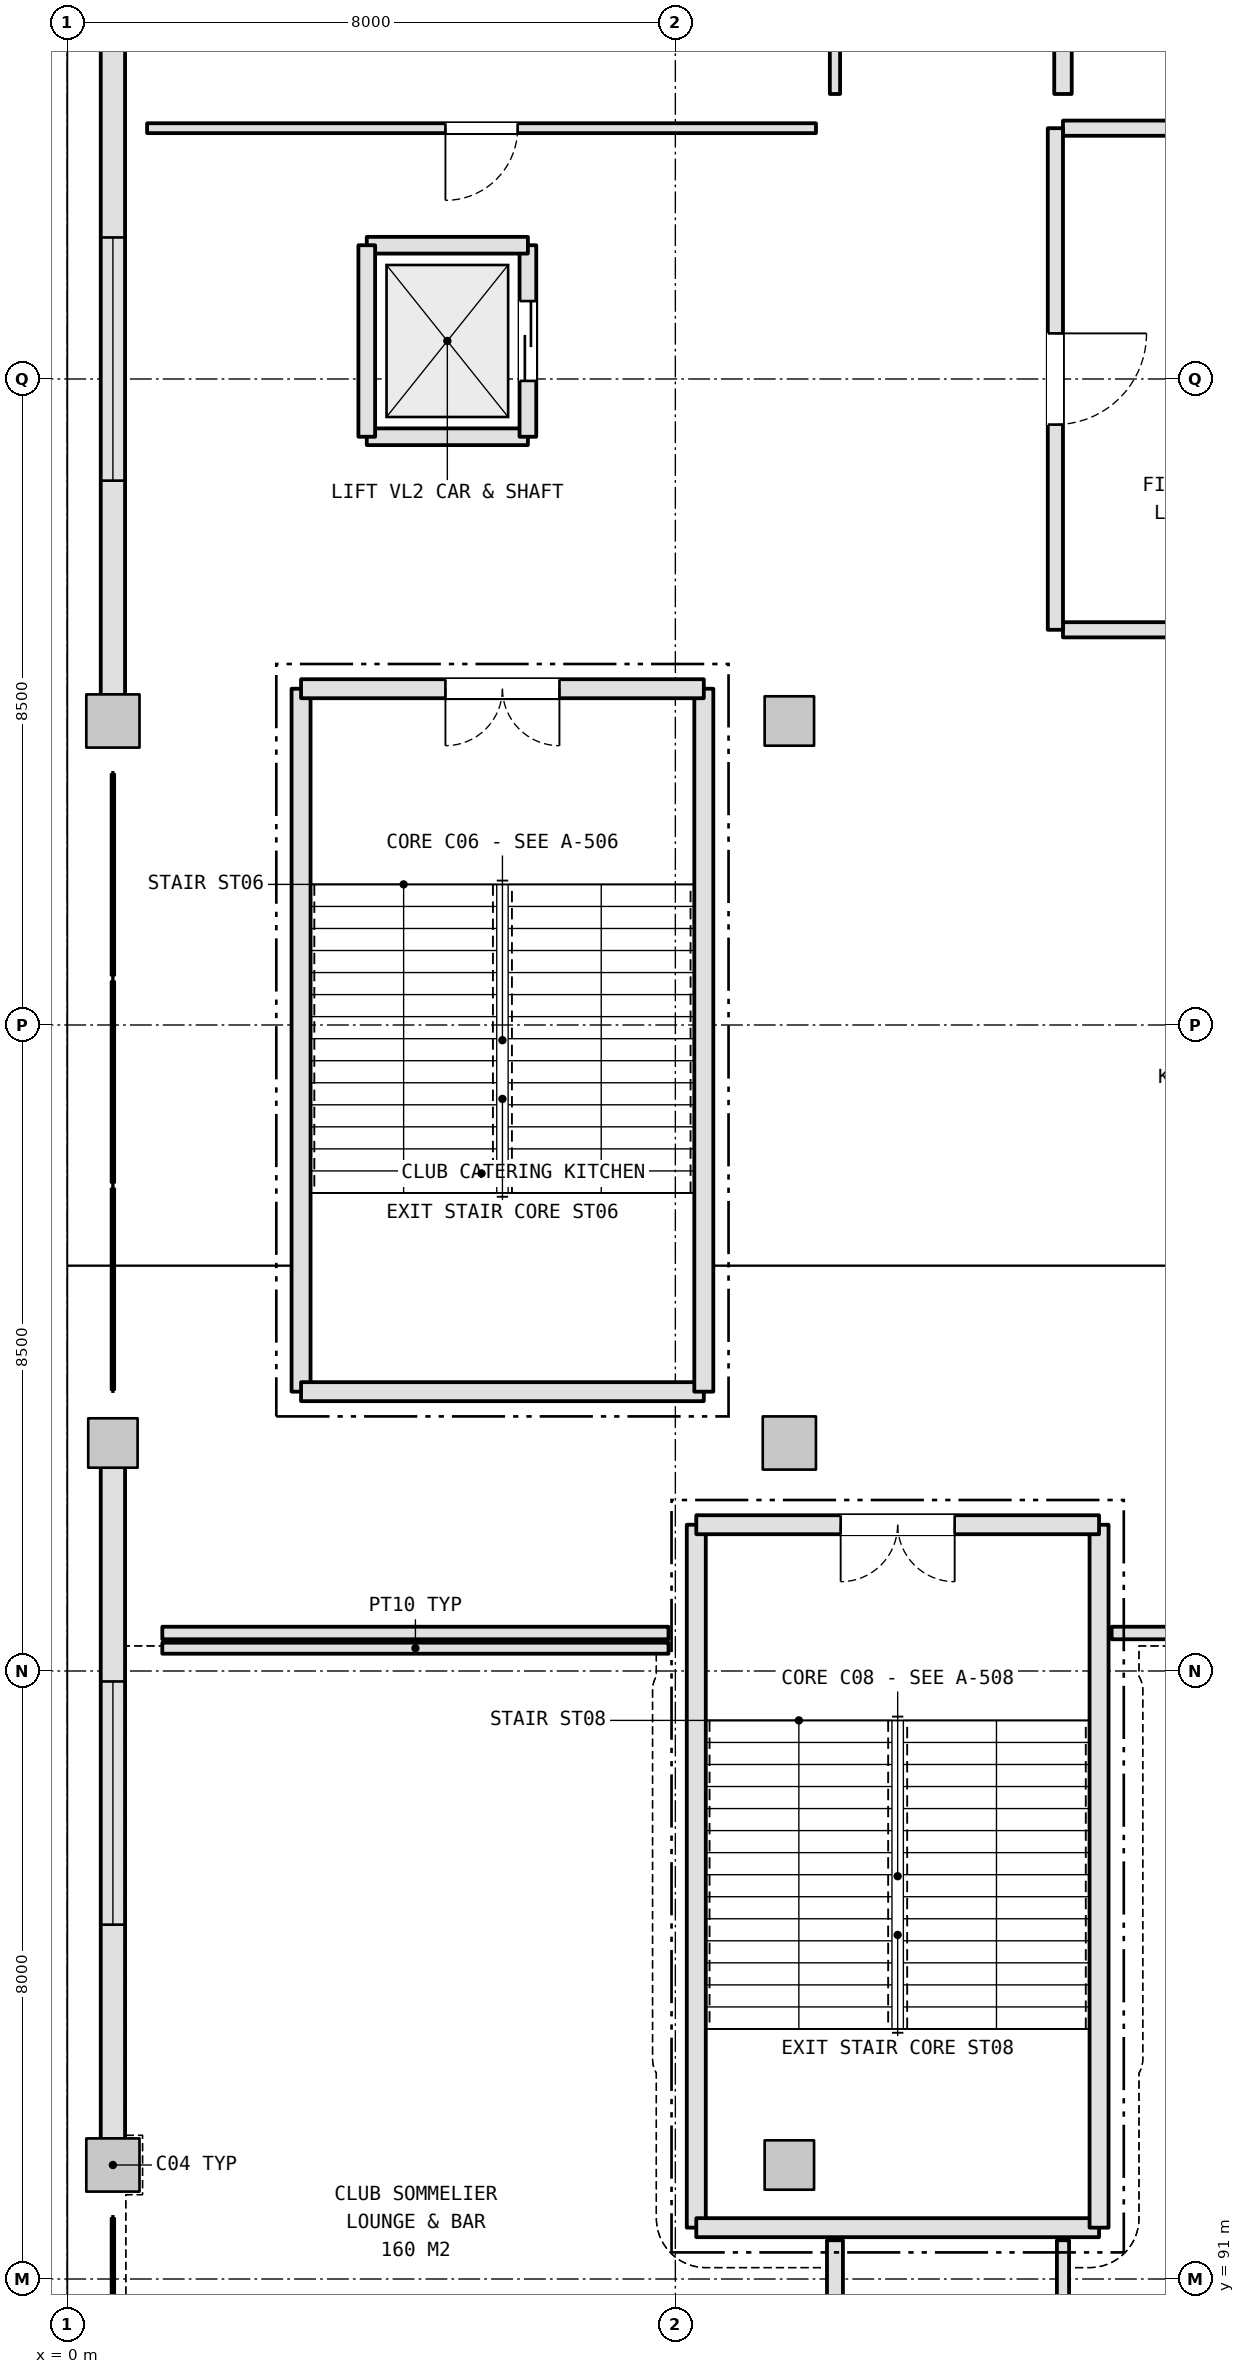
"""IFC4 building model, lengths in metres.
Left out: names, types, materials, properties, quantities, classifications, styles, units other than length and angle.
Written with IfcOpenShell. Run it as: python <this file> out.ifc"""

import sys

from ifc_helpers import new_model, si_unit, direction, frame, frame_2d, origin, origin_2d, place, context, subcontext, project, spatial, rectangle, extrude, element, fill, save


model = new_model("IFC4")
c1 = context("Model", 3, precision=1e-05, world=origin(), true_north=direction((0.0, 1.0)))
c2 = subcontext(c1, "Body", "Model", "MODEL_VIEW")
j1 = project(units=[si_unit("LENGTHUNIT", "METRE"), si_unit("PLANEANGLEUNIT", "RADIAN")], contexts=[c1])
p1 = place(None, origin())
s1 = spatial("IfcSite", under=j1, at=p1, CompositionType="ELEMENT")
p2 = place(p1, origin())
s2 = spatial("IfcBuilding", under=s1, at=p2, CompositionType="ELEMENT")
p3 = place(p2, frame((0.0, 0.0, 10.8)))
s3 = spatial("IfcBuildingStorey", under=s2, at=p3, CompositionType="ELEMENT", Elevation=10.8)
p4 = place(p3, frame((0.6, 92.5, 0.0), z_axis=(0.0, 0.0, 1.0), x_axis=(1.0, 0.0, 0.0)))
e1 = element("IfcColumn", 1, at=p4, inside=s3, PredefinedType="COLUMN", context=c2, shape_type="SweptSolid", body=[
    extrude(rectangle(XDim=0.7, YDim=0.7, at=origin_2d()), origin(), (0.0, 0.0, 1.0), 5.4),
])
p5 = place(p3, frame((0.6, 102.0, 0.0), z_axis=(0.0, 0.0, 1.0), x_axis=(1.0, 0.0, 0.0)))
e2 = element("IfcColumn", 2, at=p5, inside=s3, PredefinedType="COLUMN", context=c2, shape_type="SweptSolid", body=[
    extrude(rectangle(XDim=0.65, YDim=0.65, at=origin_2d()), origin(), (0.0, 0.0, 1.0), 5.4),
])
p6 = place(p3, frame((0.6, 111.5, 0.0), z_axis=(0.0, 0.0, 1.0), x_axis=(1.0, 0.0, 0.0)))
e3 = element("IfcColumn", 3, at=p6, inside=s3, PredefinedType="COLUMN", context=c2, shape_type="SweptSolid", body=[
    extrude(rectangle(XDim=0.7, YDim=0.7, at=origin_2d()), origin(), (0.0, 0.0, 1.0), 5.4),
])
p7 = place(p3, frame((9.5, 92.5, 0.0), z_axis=(0.0, 0.0, 1.0), x_axis=(1.0, 0.0, 0.0)))
e4 = element("IfcColumn", 4, at=p7, inside=s3, PredefinedType="COLUMN", context=c2, shape_type="SweptSolid", body=[
    extrude(rectangle(XDim=0.65, YDim=0.65, at=origin_2d()), origin(), (0.0, 0.0, 1.0), 5.4),
])
p8 = place(p3, frame((9.5, 102.0, 0.0), z_axis=(0.0, 0.0, 1.0), x_axis=(1.0, 0.0, 0.0)))
e5 = element("IfcColumn", 5, at=p8, inside=s3, PredefinedType="COLUMN", context=c2, shape_type="SweptSolid", body=[
    extrude(rectangle(XDim=0.7, YDim=0.7, at=origin_2d()), origin(), (0.0, 0.0, 1.0), 5.4),
])
p9 = place(p3, frame((9.5, 111.5, 0.0), z_axis=(0.0, 0.0, 1.0), x_axis=(1.0, 0.0, 0.0)))
e6 = element("IfcColumn", 6, at=p9, inside=s3, PredefinedType="COLUMN", context=c2, shape_type="SweptSolid", body=[
    extrude(rectangle(XDim=0.65, YDim=0.65, at=origin_2d()), origin(), (0.0, 0.0, 1.0), 5.4),
])
p10 = place(p3, frame((0.6, 92.838, 0.0), z_axis=(0.0, 0.0, 1.0), x_axis=(0.0, 1.0, 0.0)))
e7 = element("IfcWall", 7, at=p10, inside=s3, PredefinedType="SOLIDWALL", context=c2, shape_type="SweptSolid", body=[
    extrude(rectangle(XDim=8.849, YDim=0.32, at=frame_2d((4.425, 0.0))), origin(), (0.0, 0.0, 1.0), 4.485),
])
p11 = place(p10, frame((2.824, 0.0, 1.05)))
e8 = element("IfcOpeningElement", 8, at=p11, cuts=e7, PredefinedType="OPENING", context=c2, shape_type="SweptSolid", body=[
    extrude(rectangle(XDim=3.2, YDim=2.2, at=frame_2d((1.6, 1.1))), frame((0.0, 0.17, 0.0), z_axis=(0.0, -1.0, 0.0), x_axis=(1.0, 0.0, 0.0)), (0.0, 0.0, 1.0), 0.34),
])
p12 = place(p3, frame((0.6, 111.838, 0.0), z_axis=(0.0, 0.0, 1.0), x_axis=(0.0, 1.0, 0.0)))
e9 = element("IfcWall", 9, at=p12, inside=s3, PredefinedType="SOLIDWALL", context=c2, shape_type="SweptSolid", body=[
    extrude(rectangle(XDim=8.849, YDim=0.32, at=frame_2d((4.425, 0.0))), origin(), (0.0, 0.0, 1.0), 4.485),
])
p13 = place(p12, frame((2.824, 0.0, 1.05)))
e10 = element("IfcOpeningElement", 10, at=p13, cuts=e9, PredefinedType="OPENING", context=c2, shape_type="SweptSolid", body=[
    extrude(rectangle(XDim=3.2, YDim=2.2, at=frame_2d((1.6, 1.1))), frame((0.0, 0.17, 0.0), z_axis=(0.0, -1.0, 0.0), x_axis=(1.0, 0.0, 0.0)), (0.0, 0.0, 1.0), 0.34),
])
p14 = place(p3, frame((3.075, 111.925, 0.0), z_axis=(0.0, 0.0, 1.0), x_axis=(0.0, -1.0, 0.0)))
e11 = element("IfcWall", 11, at=p14, inside=s3, PredefinedType="SHEAR", context=c2, shape_type="SweptSolid", body=[
    extrude(rectangle(XDim=9.249, YDim=0.25, at=frame_2d((4.625, 0.0))), origin(), (0.0, 0.0, 1.0), 5.15),
])
p15 = place(p3, frame((3.075, 102.675, 0.0), z_axis=(0.0, 0.0, 1.0), x_axis=(1.0, 0.0, 0.0)))
e12 = element("IfcWall", 12, at=p15, inside=s3, PredefinedType="SHEAR", context=c2, shape_type="SweptSolid", body=[
    extrude(rectangle(XDim=5.299, YDim=0.25, at=frame_2d((2.649, 0.0))), origin(), (0.0, 0.0, 1.0), 5.15),
])
p16 = place(p3, frame((8.375, 102.675, 0.0), z_axis=(0.0, 0.0, 1.0), x_axis=(0.0, 1.0, 0.0)))
e13 = element("IfcWall", 13, at=p16, inside=s3, PredefinedType="SHEAR", context=c2, shape_type="SweptSolid", body=[
    extrude(rectangle(XDim=9.249, YDim=0.25, at=frame_2d((4.625, 0.0))), origin(), (0.0, 0.0, 1.0), 5.15),
])
p17 = place(p3, frame((8.375, 111.925, 0.0), z_axis=(0.0, 0.0, 1.0), x_axis=(-1.0, 0.0, 0.0)))
e14 = element("IfcWall", 14, at=p17, inside=s3, PredefinedType="SHEAR", context=c2, shape_type="SweptSolid", body=[
    extrude(rectangle(XDim=5.299, YDim=0.25, at=frame_2d((2.649, 0.0))), origin(), (0.0, 0.0, 1.0), 5.15),
])
p18 = place(p17, frame((1.9, 0.0, 0.0)))
e15 = element("IfcOpeningElement", 15, at=p18, cuts=e14, PredefinedType="OPENING", context=c2, shape_type="SweptSolid", body=[
    extrude(rectangle(XDim=1.5, YDim=2.2, at=frame_2d((0.75, 1.1))), frame((0.0, 0.135, 0.0), z_axis=(0.0, -1.0, 0.0), x_axis=(1.0, 0.0, 0.0)), (0.0, 0.0, 1.0), 0.27),
])
p19 = place(p3, frame((8.275, 100.925, 0.0), z_axis=(0.0, 0.0, 1.0), x_axis=(0.0, -1.0, 0.0)))
e16 = element("IfcWall", 16, at=p19, inside=s3, PredefinedType="SHEAR", context=c2, shape_type="SweptSolid", body=[
    extrude(rectangle(XDim=9.249, YDim=0.25, at=frame_2d((4.625, 0.0))), origin(), (0.0, 0.0, 1.0), 5.15),
])
p20 = place(p3, frame((8.275, 91.675, 0.0), z_axis=(0.0, 0.0, 1.0), x_axis=(1.0, 0.0, 0.0)))
e17 = element("IfcWall", 17, at=p20, inside=s3, PredefinedType="SHEAR", context=c2, shape_type="SweptSolid", body=[
    extrude(rectangle(XDim=5.299, YDim=0.25, at=frame_2d((2.65, 0.0))), origin(), (0.0, 0.0, 1.0), 5.15),
])
p21 = place(p3, frame((13.575, 91.675, 0.0), z_axis=(0.0, 0.0, 1.0), x_axis=(0.0, 1.0, 0.0)))
e18 = element("IfcWall", 18, at=p21, inside=s3, PredefinedType="SHEAR", context=c2, shape_type="SweptSolid", body=[
    extrude(rectangle(XDim=9.249, YDim=0.25, at=frame_2d((4.625, 0.0))), origin(), (0.0, 0.0, 1.0), 5.15),
])
p22 = place(p3, frame((13.575, 100.925, 0.0), z_axis=(0.0, 0.0, 1.0), x_axis=(-1.0, 0.0, 0.0)))
e19 = element("IfcWall", 19, at=p22, inside=s3, PredefinedType="SHEAR", context=c2, shape_type="SweptSolid", body=[
    extrude(rectangle(XDim=5.299, YDim=0.25, at=frame_2d((2.65, 0.0))), origin(), (0.0, 0.0, 1.0), 5.15),
])
p23 = place(p22, frame((1.9, 0.0, 0.0)))
e20 = element("IfcOpeningElement", 20, at=p23, cuts=e19, PredefinedType="OPENING", context=c2, shape_type="SweptSolid", body=[
    extrude(rectangle(XDim=1.5, YDim=2.2, at=frame_2d((0.75, 1.1))), frame((0.0, 0.135, 0.0), z_axis=(0.0, -1.0, 0.0), x_axis=(1.0, 0.0, 0.0)), (0.0, 0.0, 1.0), 0.27),
])
for number, where, z_axis, x_axis in (
    (21, (13.1, 112.7, 0.0), (0.0, 0.0, 1.0), (1.0, 0.0, 0.0)),
    (22, (16.5, 119.3, 0.0), (0.0, 0.0, 1.0), (-1.0, 0.0, 0.0)),
):
    element("IfcWall", number, at=place(p3, frame(where, z_axis=z_axis, x_axis=x_axis)), inside=s3, PredefinedType="SOLIDWALL", context=c2, shape_type="SweptSolid", body=[
        extrude(rectangle(XDim=3.4, YDim=0.2, at=frame_2d((1.7, 0.0))), origin(), (0.0, 0.0, 1.0), 5.12),
    ])
p24 = place(p3, frame((13.0, 119.3, 0.0), z_axis=(0.0, 0.0, 1.0), x_axis=(0.0, -1.0, 0.0)))
e23 = element("IfcWall", 23, at=p24, inside=s3, PredefinedType="SOLIDWALL", context=c2, shape_type="SweptSolid", body=[
    extrude(rectangle(XDim=6.6, YDim=0.2, at=frame_2d((3.3, 0.0))), origin(), (0.0, 0.0, 1.0), 5.12),
])
p25 = place(p24, frame((2.7, 0.0, 0.0)))
e24 = element("IfcOpeningElement", 24, at=p25, cuts=e23, PredefinedType="OPENING", context=c2, shape_type="SweptSolid", body=[
    extrude(rectangle(XDim=1.2, YDim=2.2, at=frame_2d((0.6, 1.1))), frame((0.0, 0.11, 0.0), z_axis=(0.0, -1.0, 0.0), x_axis=(1.0, 0.0, 0.0)), (0.0, 0.0, 1.0), 0.22),
])
p26 = place(p3, frame((3.94, 115.24, 0.0), z_axis=(0.0, 0.0, 1.0), x_axis=(1.0, 0.0, 0.0)))
e25 = element("IfcWall", 25, at=p26, inside=s3, PredefinedType="SHEAR", context=c2, shape_type="SweptSolid", body=[
    extrude(rectangle(XDim=2.12, YDim=0.22, at=frame_2d((1.06, 0.0))), origin(), (0.0, 0.0, 1.0), 5.15),
])
p27 = place(p3, frame((6.06, 115.24, 0.0), z_axis=(0.0, 0.0, 1.0), x_axis=(0.0, 1.0, 0.0)))
e26 = element("IfcWall", 26, at=p27, inside=s3, PredefinedType="SHEAR", context=c2, shape_type="SweptSolid", body=[
    extrude(rectangle(XDim=2.52, YDim=0.22, at=frame_2d((1.26, 0.0))), origin(), (0.0, 0.0, 1.0), 5.15),
])
p28 = place(p27, frame((0.735, 0.0, 0.0)))
e27 = element("IfcOpeningElement", 27, at=p28, cuts=e26, PredefinedType="OPENING", context=c2, shape_type="SweptSolid", body=[
    extrude(rectangle(XDim=1.05, YDim=2.15, at=frame_2d((0.525, 1.075))), frame((0.0, 0.12, 0.0), z_axis=(0.0, -1.0, 0.0), x_axis=(1.0, 0.0, 0.0)), (0.0, 0.0, 1.0), 0.24),
])
p29 = place(p3, frame((6.06, 117.76, 0.0), z_axis=(0.0, 0.0, 1.0), x_axis=(-1.0, 0.0, 0.0)))
e28 = element("IfcWall", 28, at=p29, inside=s3, PredefinedType="SHEAR", context=c2, shape_type="SweptSolid", body=[
    extrude(rectangle(XDim=2.12, YDim=0.22, at=frame_2d((1.06, 0.0))), origin(), (0.0, 0.0, 1.0), 5.15),
])
p30 = place(p3, frame((3.94, 117.76, 0.0), z_axis=(0.0, 0.0, 1.0), x_axis=(0.0, -1.0, 0.0)))
e29 = element("IfcWall", 29, at=p30, inside=s3, PredefinedType="SHEAR", context=c2, shape_type="SweptSolid", body=[
    extrude(rectangle(XDim=2.52, YDim=0.22, at=frame_2d((1.26, 0.0))), origin(), (0.0, 0.0, 1.0), 5.15),
])
p31 = place(p3, frame((10.1, 91.51, 0.0), z_axis=(0.0, 0.0, 1.0), x_axis=(0.0, -1.0, 0.0)))
e30 = element("IfcWall", 30, at=p31, inside=s3, PredefinedType="PLUMBINGWALL", context=c2, shape_type="SweptSolid", body=[
    extrude(rectangle(XDim=13.76, YDim=0.21, at=frame_2d((6.88, 0.0))), origin(), (0.0, 0.0, 1.0), 4.678),
])
p32 = place(p31, frame((6.4, 0.0, 0.0)))
e31 = element("IfcOpeningElement", 31, at=p32, cuts=e30, PredefinedType="OPENING", context=c2, shape_type="SweptSolid", body=[
    extrude(rectangle(XDim=0.96, YDim=2.15, at=frame_2d((0.48, 1.075))), frame((0.0, 0.115, 0.0), z_axis=(0.0, -1.0, 0.0), x_axis=(1.0, 0.0, 0.0)), (0.0, 0.0, 1.0), 0.23),
])
p33 = place(p3, frame((1.25, 99.3, 0.0), z_axis=(0.0, 0.0, 1.0), x_axis=(1.0, 0.0, 0.0)))
e32 = element("IfcWall", 32, at=p33, inside=s3, PredefinedType="PARTITIONING", context=c2, shape_type="SweptSolid", body=[
    extrude(rectangle(XDim=6.66, YDim=0.145, at=frame_2d((3.33, 0.0))), origin(), (0.0, 0.0, 1.0), 5.12),
])
p34 = place(p3, frame((13.1, 77.75, 0.0), z_axis=(0.0, 0.0, 1.0), x_axis=(0.0, 1.0, 0.0)))
e33 = element("IfcWall", 33, at=p34, inside=s3, PredefinedType="PARTITIONING", context=c2, shape_type="SweptSolid", body=[
    extrude(rectangle(XDim=13.76, YDim=0.16, at=frame_2d((6.88, 0.0))), origin(), (0.0, 0.0, 1.0), 4.678),
])
p35 = place(p34, frame((6.305, 0.0, 0.0)))
e34 = element("IfcOpeningElement", 34, at=p35, cuts=e33, PredefinedType="OPENING", context=c2, shape_type="SweptSolid", body=[
    extrude(rectangle(XDim=1.15, YDim=2.2, at=frame_2d((0.575, 1.1))), frame((0.0, 0.09, 0.0), z_axis=(0.0, -1.0, 0.0), x_axis=(1.0, 0.0, 0.0)), (0.0, 0.0, 1.0), 0.18),
])
p36 = place(p3, frame((1.05, 119.3, 0.0), z_axis=(0.0, 0.0, 1.0), x_axis=(1.0, 0.0, 0.0)))
e35 = element("IfcWall", 35, at=p36, inside=s3, PredefinedType="PARTITIONING", context=c2, shape_type="SweptSolid", body=[
    extrude(rectangle(XDim=8.8, YDim=0.13, at=frame_2d((4.4, 0.0))), origin(), (0.0, 0.0, 1.0), 4.485),
])
p37 = place(p36, frame((3.925, 0.0, 0.0)))
e36 = element("IfcOpeningElement", 36, at=p37, cuts=e35, PredefinedType="OPENING", context=c2, shape_type="SweptSolid", body=[
    extrude(rectangle(XDim=0.95, YDim=2.15, at=frame_2d((0.475, 1.075))), frame((0.0, 0.075, 0.0), z_axis=(0.0, -1.0, 0.0), x_axis=(1.0, 0.0, 0.0)), (0.0, 0.0, 1.0), 0.15),
])
p38 = place(p3, frame((7.91, 99.5, 0.0), z_axis=(0.0, 0.0, 1.0), x_axis=(-1.0, 0.0, 0.0)))
e37 = element("IfcWall", 37, at=p38, inside=s3, PredefinedType="PARTITIONING", context=c2, shape_type="SweptSolid", body=[
    extrude(rectangle(XDim=6.66, YDim=0.165, at=frame_2d((3.33, 0.0))), origin(), (0.0, 0.0, 1.0), 5.12),
])
p39 = place(p3, frame((17.95, 99.5, 0.0), z_axis=(0.0, 0.0, 1.0), x_axis=(-1.0, 0.0, 0.0)))
e38 = element("IfcWall", 38, at=p39, inside=s3, PredefinedType="PARTITIONING", context=c2, shape_type="SweptSolid", body=[
    extrude(rectangle(XDim=4.21, YDim=0.165, at=frame_2d((2.105, 0.0))), origin(), (0.0, 0.0, 1.0), 5.12),
])
p40 = place(p39, frame((1.555, 0.0, 0.0)))
e39 = element("IfcOpeningElement", 39, at=p40, cuts=e38, PredefinedType="OPENING", context=c2, shape_type="SweptSolid", body=[
    extrude(rectangle(XDim=1.1, YDim=2.15, at=frame_2d((0.55, 1.075))), frame((0.0, 0.093, 0.0), z_axis=(0.0, -1.0, 0.0), x_axis=(1.0, 0.0, 0.0)), (0.0, 0.0, 1.0), 0.185),
])
p41 = place(p3, frame((10.1, 129.05, 0.0), z_axis=(0.0, 0.0, 1.0), x_axis=(0.0, -1.0, 0.0)))
e40 = element("IfcWall", 40, at=p41, inside=s3, PredefinedType="PARTITIONING", context=c2, shape_type="SweptSolid", body=[
    extrude(rectangle(XDim=9.3, YDim=0.135, at=frame_2d((4.65, 0.0))), origin(), (0.0, 0.0, 1.0), 4.678),
])
p42 = place(p41, frame((4.2, 0.0, 0.0)))
e41 = element("IfcOpeningElement", 41, at=p42, cuts=e40, PredefinedType="OPENING", context=c2, shape_type="SweptSolid", body=[
    extrude(rectangle(XDim=1.7, YDim=2.25, at=frame_2d((0.85, 1.125))), frame((0.0, 0.077, 0.0), z_axis=(0.0, -1.0, 0.0), x_axis=(1.0, 0.0, 0.0)), (0.0, 0.0, 1.0), 0.155),
])
p43 = place(p3, frame((13.1, 119.75, 0.0), z_axis=(0.0, 0.0, 1.0), x_axis=(0.0, 1.0, 0.0)))
e42 = element("IfcWall", 42, at=p43, inside=s3, PredefinedType="PLUMBINGWALL", context=c2, shape_type="SweptSolid", body=[
    extrude(rectangle(XDim=9.3, YDim=0.23, at=frame_2d((4.65, 0.0))), origin(), (0.0, 0.0, 1.0), 4.678),
])
p44 = place(p43, frame((4.16, 0.0, 0.0)))
e43 = element("IfcOpeningElement", 43, at=p44, cuts=e42, PredefinedType="OPENING", context=c2, shape_type="SweptSolid", body=[
    extrude(rectangle(XDim=0.98, YDim=2.15, at=frame_2d((0.49, 1.075))), frame((0.0, 0.125, 0.0), z_axis=(0.0, -1.0, 0.0), x_axis=(1.0, 0.0, 0.0)), (0.0, 0.0, 1.0), 0.25),
])
p45 = place(p11, origin())
e44 = element("IfcWindow", 44, at=p45, inside=s3, PartitioningType="SINGLE_PANEL", PredefinedType="WINDOW", context=c2, shape_type="SweptSolid", body=[
    extrude(rectangle(XDim=3.2, YDim=2.2, at=frame_2d((1.6, 1.1))), frame((0.0, 0.03, 0.0), z_axis=(0.0, -1.0, 0.0), x_axis=(1.0, 0.0, 0.0)), (0.0, 0.0, 1.0), 0.06),
])
fill(e8, e44)
p46 = place(p13, origin())
e45 = element("IfcWindow", 45, at=p46, inside=s3, PartitioningType="SINGLE_PANEL", PredefinedType="WINDOW", context=c2, shape_type="SweptSolid", body=[
    extrude(rectangle(XDim=3.2, YDim=2.2, at=frame_2d((1.6, 1.1))), frame((0.0, 0.03, 0.0), z_axis=(0.0, -1.0, 0.0), x_axis=(1.0, 0.0, 0.0)), (0.0, 0.0, 1.0), 0.06),
])
fill(e10, e45)
p47 = place(p18, origin())
e46 = element("IfcDoor", 46, at=p47, inside=s3, OperationType="DOUBLE_DOOR_SINGLE_SWING", PredefinedType="DOOR", context=c2, shape_type="SweptSolid", body=[
    extrude(rectangle(XDim=1.5, YDim=2.2, at=frame_2d((0.75, 1.1))), frame((0.0, 0.025, 0.0), z_axis=(0.0, -1.0, 0.0), x_axis=(1.0, 0.0, 0.0)), (0.0, 0.0, 1.0), 0.05),
])
fill(e15, e46)
p48 = place(p23, origin())
e47 = element("IfcDoor", 47, at=p48, inside=s3, OperationType="DOUBLE_DOOR_SINGLE_SWING", PredefinedType="DOOR", context=c2, shape_type="SweptSolid", body=[
    extrude(rectangle(XDim=1.5, YDim=2.2, at=frame_2d((0.75, 1.1))), frame((0.0, 0.025, 0.0), z_axis=(0.0, -1.0, 0.0), x_axis=(1.0, 0.0, 0.0)), (0.0, 0.0, 1.0), 0.05),
])
fill(e20, e47)
p49 = place(p25, origin())
e48 = element("IfcDoor", 48, at=p49, inside=s3, OperationType="SINGLE_SWING_LEFT", PredefinedType="DOOR", context=c2, shape_type="SweptSolid", body=[
    extrude(rectangle(XDim=1.2, YDim=2.2, at=frame_2d((0.6, 1.1))), frame((0.0, 0.025, 0.0), z_axis=(0.0, -1.0, 0.0), x_axis=(1.0, 0.0, 0.0)), (0.0, 0.0, 1.0), 0.05),
])
fill(e24, e48)
p50 = place(p28, origin())
e49 = element("IfcDoor", 49, at=p50, inside=s3, OperationType="DOUBLE_DOOR_SLIDING", PredefinedType="DOOR", context=c2, shape_type="SweptSolid", body=[
    extrude(rectangle(XDim=1.05, YDim=2.15, at=frame_2d((0.525, 1.075))), frame((0.0, 0.025, 0.0), z_axis=(0.0, -1.0, 0.0), x_axis=(1.0, 0.0, 0.0)), (0.0, 0.0, 1.0), 0.05),
])
fill(e27, e49)
p51 = place(p37, frame((0.95, 0.0, 0.0), z_axis=(0.0, 0.0, 1.0), x_axis=(-1.0, 0.0, 0.0)))
e50 = element("IfcDoor", 50, at=p51, inside=s3, OperationType="SINGLE_SWING_LEFT", PredefinedType="DOOR", context=c2, shape_type="SweptSolid", body=[
    extrude(rectangle(XDim=0.95, YDim=2.15, at=frame_2d((0.475, 1.075))), frame((0.0, 0.025, 0.0), z_axis=(0.0, -1.0, 0.0), x_axis=(1.0, 0.0, 0.0)), (0.0, 0.0, 1.0), 0.05),
])
fill(e36, e50)
save(model, sys.argv[1])
